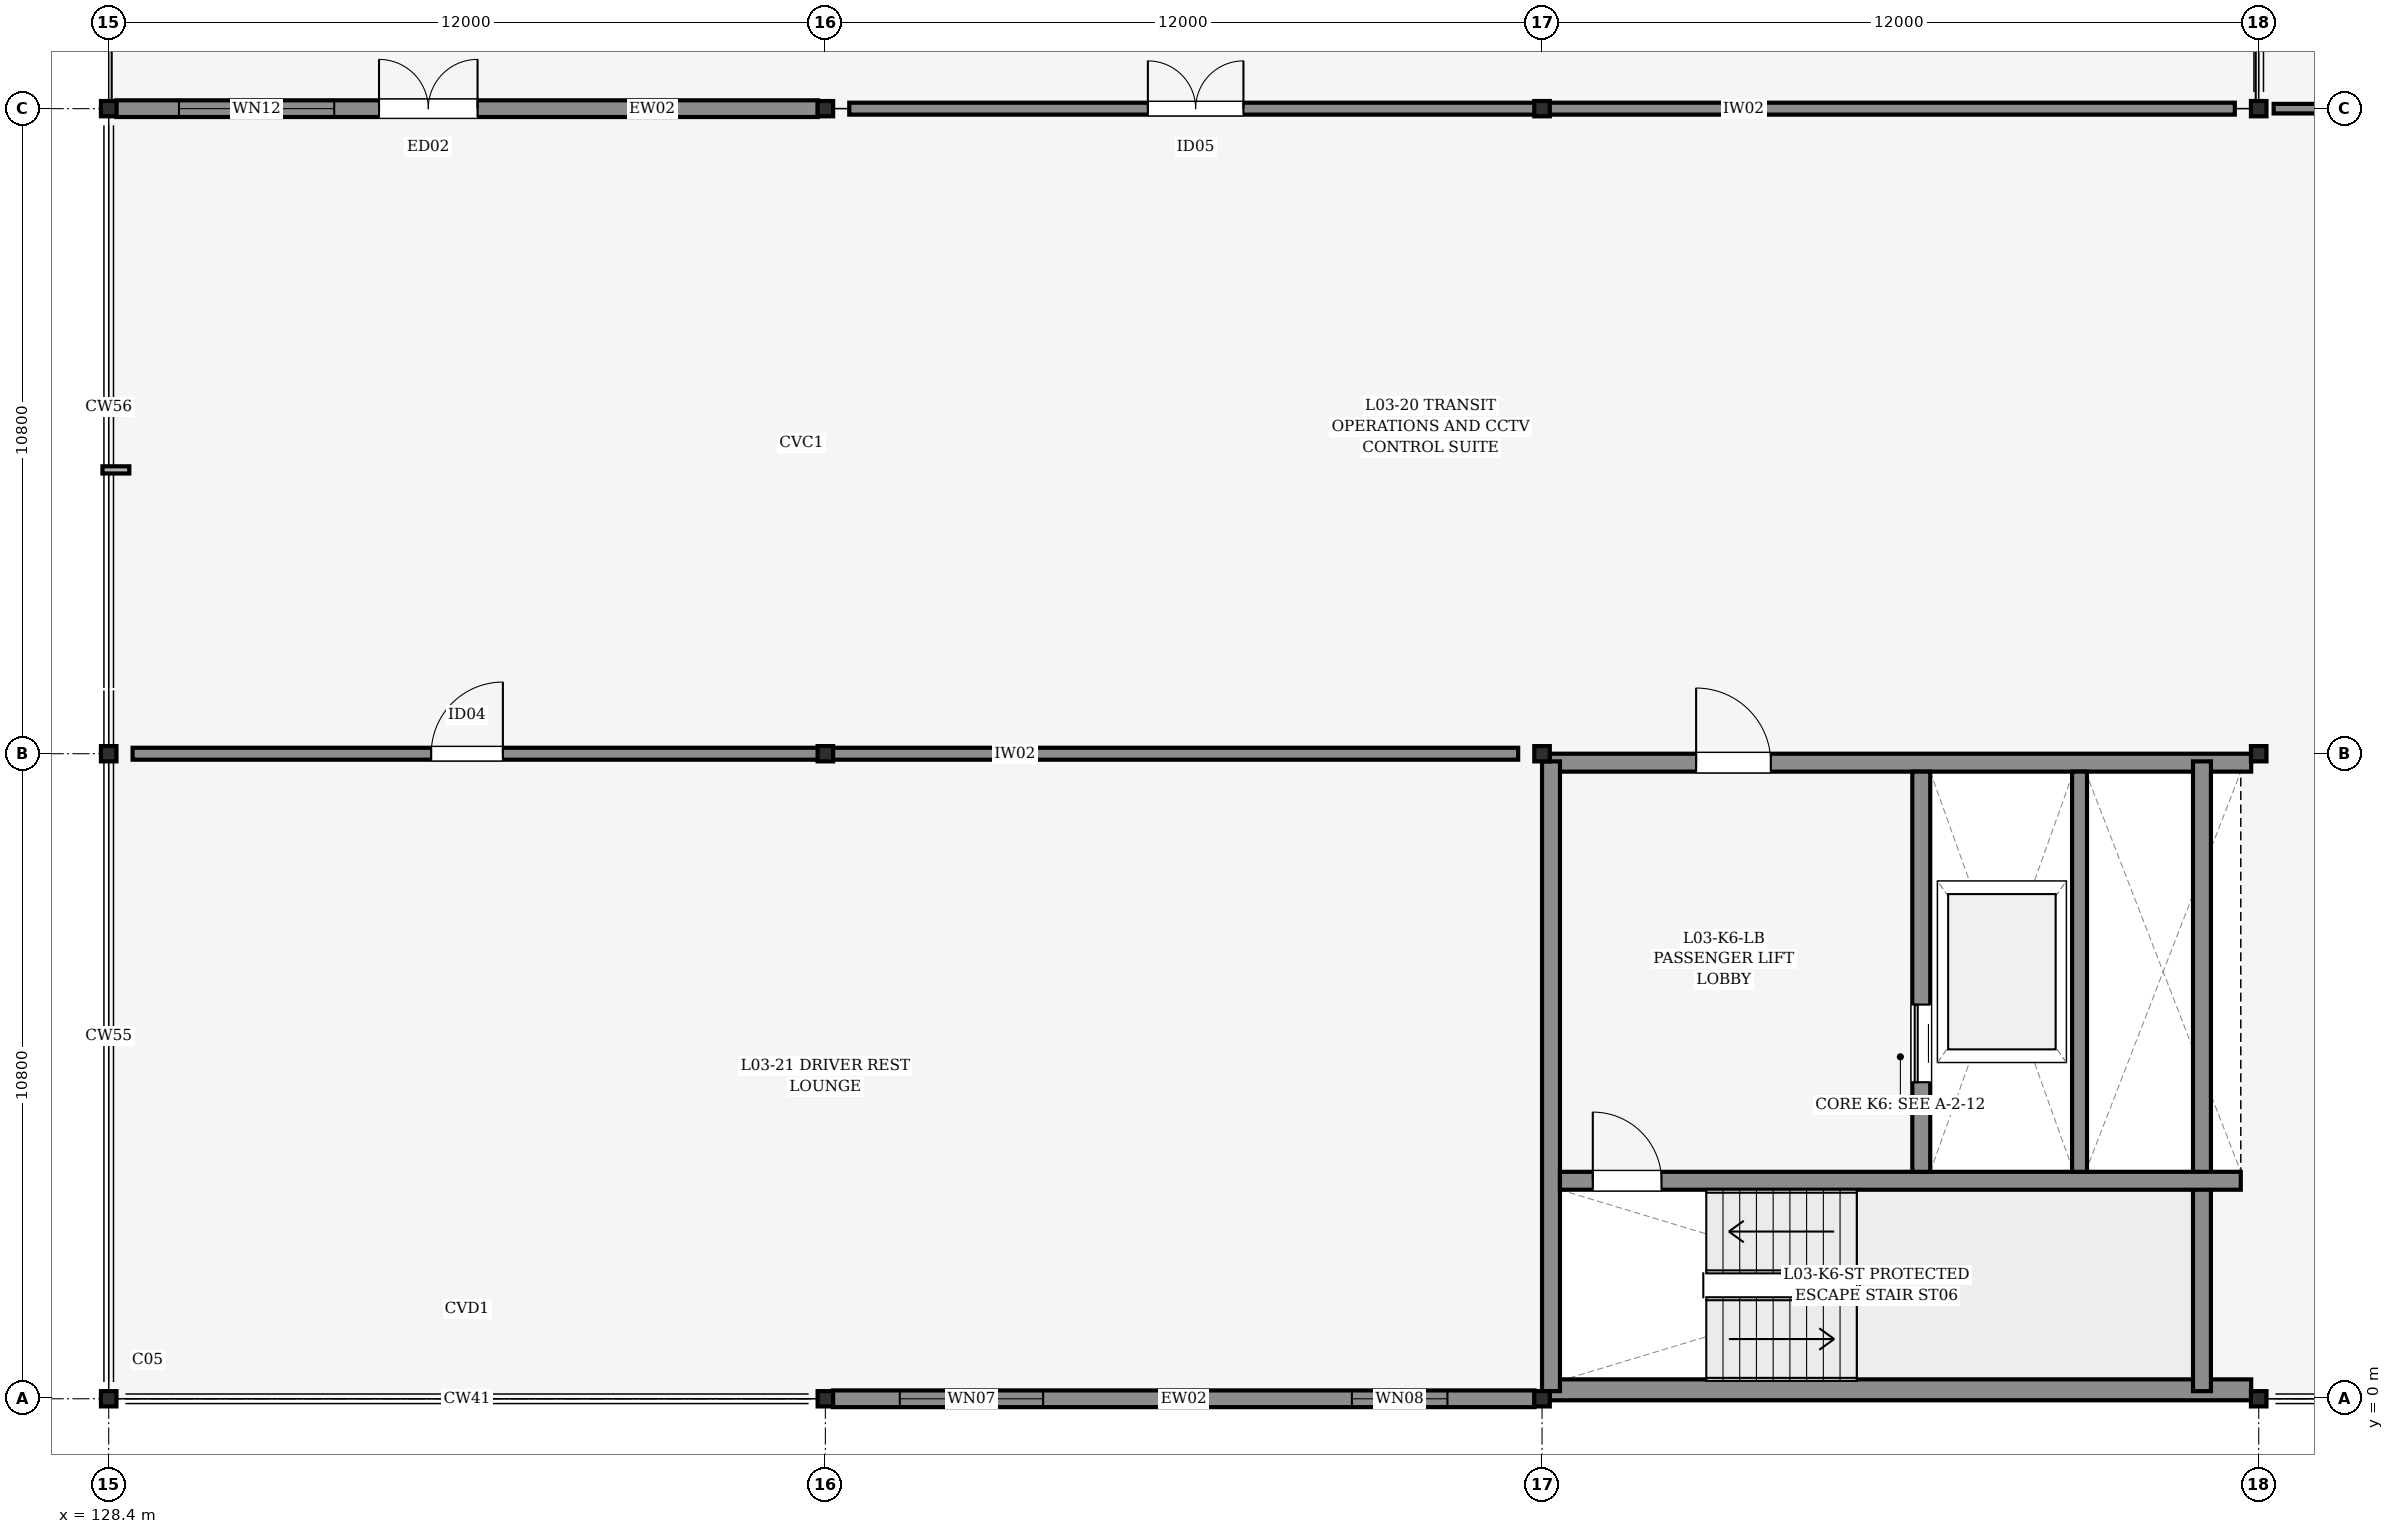
"""IFC4 building model, lengths in metres.
Left out: names, types, materials, properties, quantities, classifications, styles, units other than length and angle.
Written with IfcOpenShell. Run it as: python <this file> out.ifc"""

import sys

from ifc_helpers import new_model, si_unit, direction, frame, frame_2d, origin, origin_2d, place, context, subcontext, project, spatial, rectangle, i_section, extrude, element, fill, save


model = new_model("IFC4")
c1 = context("Model", 3, precision=1e-05, world=origin(), true_north=direction((0.0, 1.0)))
c2 = subcontext(c1, "Body", "Model", "MODEL_VIEW")
j1 = project(units=[si_unit("LENGTHUNIT", "METRE"), si_unit("PLANEANGLEUNIT", "RADIAN")], contexts=[c1])
p1 = place(None, origin())
s1 = spatial("IfcSite", under=j1, at=p1, CompositionType="ELEMENT")
p2 = place(p1, origin())
s2 = spatial("IfcBuilding", under=s1, at=p2, CompositionType="ELEMENT")
p3 = place(p2, frame((0.0, 0.0, 12.6)))
s3 = spatial("IfcBuildingStorey", under=s2, at=p3, CompositionType="ELEMENT", Elevation=12.6)
for number, where, z_axis, x_axis in (
    (1, (128.4, 0.0, 0.0), (0.0, 0.0, 1.0), (1.0, 0.0, 0.0)),
    (2, (128.4, 10.8, 0.0), (0.0, 0.0, 1.0), (1.0, 0.0, 0.0)),
    (3, (128.4, 21.6, 0.0), (0.0, 0.0, 1.0), (1.0, 0.0, 0.0)),
    (4, (140.4, 0.0, 0.0), (0.0, 0.0, 1.0), (1.0, 0.0, 0.0)),
    (5, (140.4, 10.8, 0.0), (0.0, 0.0, 1.0), (1.0, 0.0, 0.0)),
    (6, (140.4, 21.6, 0.0), (0.0, 0.0, 1.0), (1.0, 0.0, 0.0)),
    (7, (152.4, 0.0, 0.0), (0.0, 0.0, 1.0), (1.0, 0.0, 0.0)),
    (8, (152.4, 10.8, 0.0), (0.0, 0.0, 1.0), (1.0, 0.0, 0.0)),
    (9, (152.4, 21.6, 0.0), (0.0, 0.0, 1.0), (1.0, 0.0, 0.0)),
    (10, (164.4, 0.0, 0.0), (0.0, 0.0, 1.0), (1.0, 0.0, 0.0)),
    (11, (164.4, 10.8, 0.0), (0.0, 0.0, 1.0), (1.0, 0.0, 0.0)),
    (12, (164.4, 21.6, 0.0), (0.0, 0.0, 1.0), (1.0, 0.0, 0.0)),
):
    element("IfcColumn", number, at=place(p3, frame(where, z_axis=z_axis, x_axis=x_axis)), inside=s3, PredefinedType="COLUMN", context=c2, shape_type="SweptSolid", body=[
        extrude(i_section(OverallWidth=0.256, OverallDepth=0.26, WebThickness=0.01, FlangeThickness=0.017, FilletRadius=0.013, at=origin_2d()), origin(), (0.0, 0.0, 1.0), 3.6),
    ])
p4 = place(p3, frame((128.526, 21.6, 0.0), z_axis=(0.0, 0.0, 1.0), x_axis=(1.0, 0.0, 0.0)))
e13 = element("IfcWall", 13, at=p4, inside=s3, PredefinedType="STANDARD", context=c2, shape_type="SweptSolid", body=[
    extrude(rectangle(XDim=11.748, YDim=0.28, at=frame_2d((5.874, 0.0))), origin(), (0.0, 0.0, 1.0), 2.535),
])
p5 = place(p4, frame((4.4, 0.0, 0.0)))
e14 = element("IfcOpeningElement", 14, at=p5, cuts=e13, PredefinedType="OPENING", context=c2, shape_type="SweptSolid", body=[
    extrude(rectangle(XDim=1.65, YDim=2.25, at=frame_2d((0.825, 1.125))), frame((0.0, 0.15, 0.0), z_axis=(0.0, -1.0, 0.0), x_axis=(1.0, 0.0, 0.0)), (0.0, 0.0, 1.0), 0.3),
])
p6 = place(p4, frame((1.05, 0.0, 0.75)))
e15 = element("IfcOpeningElement", 15, at=p6, cuts=e13, PredefinedType="OPENING", context=c2, shape_type="SweptSolid", body=[
    extrude(rectangle(XDim=2.6, YDim=1.6, at=frame_2d((1.3, 0.8))), frame((0.0, 0.15, 0.0), z_axis=(0.0, -1.0, 0.0), x_axis=(1.0, 0.0, 0.0)), (0.0, 0.0, 1.0), 0.3),
])
p7 = place(p3, frame((140.526, 0.0, 0.0), z_axis=(0.0, 0.0, 1.0), x_axis=(1.0, 0.0, 0.0)))
e16 = element("IfcWall", 16, at=p7, inside=s3, PredefinedType="STANDARD", context=c2, shape_type="SweptSolid", body=[
    extrude(rectangle(XDim=11.748, YDim=0.28, at=frame_2d((5.874, 0.0))), origin(), (0.0, 0.0, 1.0), 2.535),
])
p8 = place(p7, frame((1.12, 0.0, 0.595)))
e17 = element("IfcOpeningElement", 17, at=p8, cuts=e16, PredefinedType="OPENING", context=c2, shape_type="SweptSolid", body=[
    extrude(rectangle(XDim=2.4, YDim=1.8, at=frame_2d((1.2, 0.9))), frame((0.0, 0.15, 0.0), z_axis=(0.0, -1.0, 0.0), x_axis=(1.0, 0.0, 0.0)), (0.0, 0.0, 1.0), 0.3),
])
p9 = place(p7, frame((8.69, 0.0, 0.65)))
e18 = element("IfcOpeningElement", 18, at=p9, cuts=e16, PredefinedType="OPENING", context=c2, shape_type="SweptSolid", body=[
    extrude(rectangle(XDim=1.6, YDim=1.6, at=frame_2d((0.8, 0.8))), frame((0.0, 0.15, 0.0), z_axis=(0.0, -1.0, 0.0), x_axis=(1.0, 0.0, 0.0)), (0.0, 0.0, 1.0), 0.3),
])
p10 = place(p3, frame((152.526, 0.15, 0.0), z_axis=(0.0, 0.0, 1.0), x_axis=(1.0, 0.0, 0.0)))
e19 = element("IfcWall", 19, at=p10, inside=s3, PredefinedType="SHEAR", context=c2, shape_type="SweptSolid", body=[
    extrude(rectangle(XDim=11.748, YDim=0.35, at=frame_2d((5.874, 0.0))), origin(), (0.0, 0.0, 1.0), 3.38),
])
p11 = place(p3, frame((152.526, 10.65, 0.0), z_axis=(0.0, 0.0, 1.0), x_axis=(1.0, 0.0, 0.0)))
e20 = element("IfcWall", 20, at=p11, inside=s3, PredefinedType="SHEAR", context=c2, shape_type="SweptSolid", body=[
    extrude(rectangle(XDim=11.748, YDim=0.3, at=frame_2d((5.874, 0.0))), origin(), (0.0, 0.0, 1.0), 3.38),
])
p12 = place(p11, frame((2.454, 0.0, 0.0)))
e21 = element("IfcOpeningElement", 21, at=p12, cuts=e20, PredefinedType="OPENING", context=c2, shape_type="SweptSolid", body=[
    extrude(rectangle(XDim=1.25, YDim=2.15, at=frame_2d((0.625, 1.075))), frame((0.0, 0.16, 0.0), z_axis=(0.0, -1.0, 0.0), x_axis=(1.0, 0.0, 0.0)), (0.0, 0.0, 1.0), 0.32),
])
for number, where, z_axis, x_axis in (
    (22, (152.55, 0.128, 0.0), (0.0, 0.0, 1.0), (0.0, 1.0, 0.0)),
    (23, (163.45, 0.128, 0.0), (0.0, 0.0, 1.0), (0.0, 1.0, 0.0)),
):
    element("IfcWall", number, at=place(p3, frame(where, z_axis=z_axis, x_axis=x_axis)), inside=s3, PredefinedType="SHEAR", context=c2, shape_type="SweptSolid", body=[
        extrude(rectangle(XDim=10.544, YDim=0.3, at=frame_2d((5.272, 0.0))), origin(), (0.0, 0.0, 1.0), 3.38),
    ])
p13 = place(p3, frame((152.7, 3.65, 0.0), z_axis=(0.0, 0.0, 1.0), x_axis=(1.0, 0.0, 0.0)))
e24 = element("IfcWall", 24, at=p13, inside=s3, PredefinedType="SHEAR", context=c2, shape_type="SweptSolid", body=[
    extrude(rectangle(XDim=11.4, YDim=0.3, at=frame_2d((5.7, 0.0))), origin(), (0.0, 0.0, 1.0), 3.38),
])
p14 = place(p13, frame((0.55, 0.0, 0.0)))
e25 = element("IfcOpeningElement", 25, at=p14, cuts=e24, PredefinedType="OPENING", context=c2, shape_type="SweptSolid", body=[
    extrude(rectangle(XDim=1.15, YDim=2.15, at=frame_2d((0.575, 1.075))), frame((0.0, 0.16, 0.0), z_axis=(0.0, -1.0, 0.0), x_axis=(1.0, 0.0, 0.0)), (0.0, 0.0, 1.0), 0.32),
])
p15 = place(p3, frame((158.75, 3.8, 0.0), z_axis=(0.0, 0.0, 1.0), x_axis=(0.0, 1.0, 0.0)))
e26 = element("IfcWall", 26, at=p15, inside=s3, PredefinedType="SHEAR", context=c2, shape_type="SweptSolid", body=[
    extrude(rectangle(XDim=6.7, YDim=0.3, at=frame_2d((3.35, 0.0))), origin(), (0.0, 0.0, 1.0), 3.38),
])
p16 = place(p15, frame((1.5, 0.0, 0.0)))
e27 = element("IfcOpeningElement", 27, at=p16, cuts=e26, PredefinedType="OPENING", context=c2, shape_type="SweptSolid", body=[
    extrude(rectangle(XDim=1.3, YDim=2.3, at=frame_2d((0.65, 1.15))), frame((0.0, 0.16, 0.0), z_axis=(0.0, -1.0, 0.0), x_axis=(1.0, 0.0, 0.0)), (0.0, 0.0, 1.0), 0.32),
])
p17 = place(p3, frame((161.4, 3.8, 0.0), z_axis=(0.0, 0.0, 1.0), x_axis=(0.0, 1.0, 0.0)))
e28 = element("IfcWall", 28, at=p17, inside=s3, PredefinedType="PARTITIONING", context=c2, shape_type="SweptSolid", body=[
    extrude(rectangle(XDim=6.7, YDim=0.25, at=frame_2d((3.35, 0.0))), origin(), (0.0, 0.0, 1.0), 2.525),
])
p18 = place(p3, frame((164.65, 21.6, 0.0), z_axis=(0.0, 0.0, 1.0), x_axis=(1.0, 0.0, 0.0)))
e29 = element("IfcWall", 29, at=p18, inside=s3, PredefinedType="PARTITIONING", context=c2, shape_type="SweptSolid", body=[
    extrude(rectangle(XDim=11.5, YDim=0.16, at=frame_2d((5.75, 0.0))), origin(), (0.0, 0.0, 1.0), 2.525),
])
p19 = place(p3, frame((128.8, 10.8, 0.0), z_axis=(0.0, 0.0, 1.0), x_axis=(1.0, 0.0, 0.0)))
e30 = element("IfcWall", 30, at=p19, inside=s3, PredefinedType="PARTITIONING", context=c2, shape_type="SweptSolid", body=[
    extrude(rectangle(XDim=23.2, YDim=0.2, at=frame_2d((11.6, 0.0))), origin(), (0.0, 0.0, 1.0), 2.525),
])
p20 = place(p19, frame((5.0, 0.0, 0.0)))
e31 = element("IfcOpeningElement", 31, at=p20, cuts=e30, PredefinedType="OPENING", context=c2, shape_type="SweptSolid", body=[
    extrude(rectangle(XDim=1.2, YDim=2.15, at=frame_2d((0.6, 1.075))), frame((0.0, 0.11, 0.0), z_axis=(0.0, -1.0, 0.0), x_axis=(1.0, 0.0, 0.0)), (0.0, 0.0, 1.0), 0.22),
])
p21 = place(p3, frame((140.8, 21.6, 0.0), z_axis=(0.0, 0.0, 1.0), x_axis=(1.0, 0.0, 0.0)))
e32 = element("IfcWall", 32, at=p21, inside=s3, PredefinedType="PARTITIONING", context=c2, shape_type="SweptSolid", body=[
    extrude(rectangle(XDim=23.2, YDim=0.2, at=frame_2d((11.6, 0.0))), origin(), (0.0, 0.0, 1.0), 2.525),
])
p22 = place(p21, frame((5.0, 0.0, 0.0)))
e33 = element("IfcOpeningElement", 33, at=p22, cuts=e32, PredefinedType="OPENING", context=c2, shape_type="SweptSolid", body=[
    extrude(rectangle(XDim=1.6, YDim=2.25, at=frame_2d((0.8, 1.125))), frame((0.0, 0.11, 0.0), z_axis=(0.0, -1.0, 0.0), x_axis=(1.0, 0.0, 0.0)), (0.0, 0.0, 1.0), 0.22),
])
p23 = place(p5, origin())
e34 = element("IfcDoor", 34, at=p23, inside=s3, OperationType="DOUBLE_DOOR_SINGLE_SWING", PredefinedType="DOOR", context=c2, shape_type="SweptSolid", body=[
    extrude(rectangle(XDim=1.65, YDim=2.25, at=frame_2d((0.825, 1.125))), frame((0.0, 0.025, 0.0), z_axis=(0.0, -1.0, 0.0), x_axis=(1.0, 0.0, 0.0)), (0.0, 0.0, 1.0), 0.05),
])
fill(e14, e34)
p24 = place(p6, origin())
e35 = element("IfcWindow", 35, at=p24, inside=s3, PartitioningType="SINGLE_PANEL", PredefinedType="WINDOW", context=c2, shape_type="SweptSolid", body=[
    extrude(rectangle(XDim=2.6, YDim=1.6, at=frame_2d((1.3, 0.8))), frame((0.0, 0.03, 0.0), z_axis=(0.0, -1.0, 0.0), x_axis=(1.0, 0.0, 0.0)), (0.0, 0.0, 1.0), 0.06),
])
fill(e15, e35)
p25 = place(p8, origin())
e36 = element("IfcWindow", 36, at=p25, inside=s3, PartitioningType="SINGLE_PANEL", PredefinedType="WINDOW", context=c2, shape_type="SweptSolid", body=[
    extrude(rectangle(XDim=2.4, YDim=1.8, at=frame_2d((1.2, 0.9))), frame((0.0, 0.03, 0.0), z_axis=(0.0, -1.0, 0.0), x_axis=(1.0, 0.0, 0.0)), (0.0, 0.0, 1.0), 0.06),
])
fill(e17, e36)
p26 = place(p9, origin())
e37 = element("IfcWindow", 37, at=p26, inside=s3, PartitioningType="SINGLE_PANEL", PredefinedType="WINDOW", context=c2, shape_type="SweptSolid", body=[
    extrude(rectangle(XDim=1.6, YDim=1.6, at=frame_2d((0.8, 0.8))), frame((0.0, 0.03, 0.0), z_axis=(0.0, -1.0, 0.0), x_axis=(1.0, 0.0, 0.0)), (0.0, 0.0, 1.0), 0.06),
])
fill(e18, e37)
p27 = place(p12, origin())
e38 = element("IfcDoor", 38, at=p27, inside=s3, OperationType="SINGLE_SWING_LEFT", PredefinedType="DOOR", context=c2, shape_type="SweptSolid", body=[
    extrude(rectangle(XDim=1.25, YDim=2.15, at=frame_2d((0.625, 1.075))), frame((0.0, 0.025, 0.0), z_axis=(0.0, -1.0, 0.0), x_axis=(1.0, 0.0, 0.0)), (0.0, 0.0, 1.0), 0.05),
])
fill(e21, e38)
p28 = place(p14, origin())
e39 = element("IfcDoor", 39, at=p28, inside=s3, OperationType="SINGLE_SWING_LEFT", PredefinedType="DOOR", context=c2, shape_type="SweptSolid", body=[
    extrude(rectangle(XDim=1.15, YDim=2.15, at=frame_2d((0.575, 1.075))), frame((0.0, 0.025, 0.0), z_axis=(0.0, -1.0, 0.0), x_axis=(1.0, 0.0, 0.0)), (0.0, 0.0, 1.0), 0.05),
])
fill(e25, e39)
p29 = place(p16, origin())
e40 = element("IfcDoor", 40, at=p29, inside=s3, OperationType="SLIDING_TO_LEFT", PredefinedType="DOOR", context=c2, shape_type="SweptSolid", body=[
    extrude(rectangle(XDim=1.3, YDim=2.3, at=frame_2d((0.65, 1.15))), frame((0.0, 0.025, 0.0), z_axis=(0.0, -1.0, 0.0), x_axis=(1.0, 0.0, 0.0)), (0.0, 0.0, 1.0), 0.05),
])
fill(e27, e40)
p30 = place(p20, origin())
e41 = element("IfcDoor", 41, at=p30, inside=s3, OperationType="SINGLE_SWING_RIGHT", PredefinedType="DOOR", context=c2, shape_type="SweptSolid", body=[
    extrude(rectangle(XDim=1.2, YDim=2.15, at=frame_2d((0.6, 1.075))), frame((0.0, 0.025, 0.0), z_axis=(0.0, -1.0, 0.0), x_axis=(1.0, 0.0, 0.0)), (0.0, 0.0, 1.0), 0.05),
])
fill(e31, e41)
p31 = place(p22, origin())
e42 = element("IfcDoor", 42, at=p31, inside=s3, OperationType="DOUBLE_DOOR_SINGLE_SWING", PredefinedType="DOOR", context=c2, shape_type="SweptSolid", body=[
    extrude(rectangle(XDim=1.6, YDim=2.25, at=frame_2d((0.8, 1.125))), frame((0.0, 0.025, 0.0), z_axis=(0.0, -1.0, 0.0), x_axis=(1.0, 0.0, 0.0)), (0.0, 0.0, 1.0), 0.05),
])
fill(e33, e42)
save(model, sys.argv[1])
